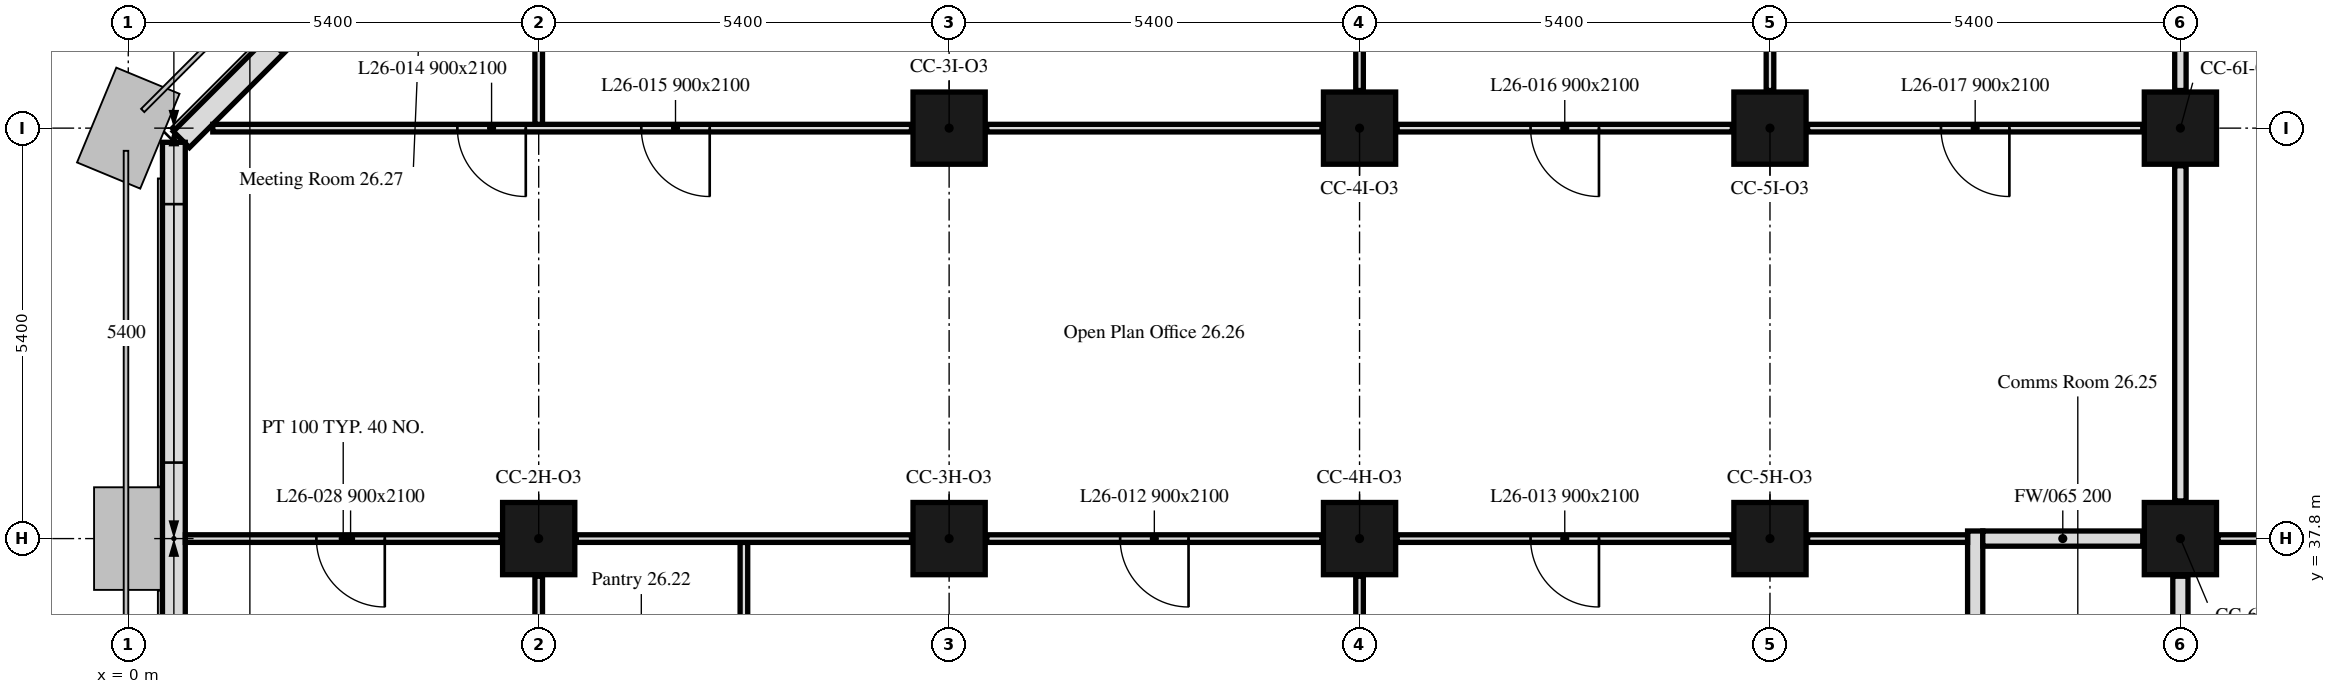
"""IFC4 building model, lengths in metres.
Left out: names, types, materials, properties, quantities, classifications, styles, units other than length and angle.
Written with IfcOpenShell. Run it as: python <this file> out.ifc"""

import sys

from ifc_helpers import new_model, si_unit, direction, frame, frame_2d, origin, origin_2d, place, context, subcontext, project, spatial, rectangle, extrude, element, fill, save


model = new_model("IFC4")
c1 = context("Model", 3, precision=1e-05, world=origin(), true_north=direction((0.0, 1.0)))
c2 = subcontext(c1, "Body", "Model", "MODEL_VIEW")
j1 = project(units=[si_unit("LENGTHUNIT", "METRE"), si_unit("PLANEANGLEUNIT", "RADIAN")], contexts=[c1])
p1 = place(None, origin())
s1 = spatial("IfcSite", under=j1, at=p1, CompositionType="ELEMENT")
p2 = place(p1, origin())
s2 = spatial("IfcBuilding", under=s1, at=p2, CompositionType="ELEMENT")
p3 = place(p2, frame((0.0, 0.0, 110.6)))
s3 = spatial("IfcBuildingStorey", under=s2, at=p3, CompositionType="ELEMENT", Elevation=110.6)
for number, where, z_axis, x_axis in (
    (1, (5.4, 37.8, 0.0), (0.0, 0.0, 1.0), (1.0, 0.0, 0.0)),
    (2, (10.8, 37.8, 0.0), (0.0, 0.0, 1.0), (1.0, 0.0, 0.0)),
    (3, (16.2, 37.8, 0.0), (0.0, 0.0, 1.0), (1.0, 0.0, 0.0)),
    (4, (21.6, 37.8, 0.0), (0.0, 0.0, 1.0), (1.0, 0.0, 0.0)),
    (5, (27.0, 37.8, 0.0), (0.0, 0.0, 1.0), (1.0, 0.0, 0.0)),
    (6, (10.8, 43.2, 0.0), (0.0, 0.0, 1.0), (1.0, 0.0, 0.0)),
    (7, (16.2, 43.2, 0.0), (0.0, 0.0, 1.0), (1.0, 0.0, 0.0)),
    (8, (21.6, 43.2, 0.0), (0.0, 0.0, 1.0), (1.0, 0.0, 0.0)),
    (9, (27.0, 43.2, 0.0), (0.0, 0.0, 1.0), (1.0, 0.0, 0.0)),
):
    element("IfcColumn", number, at=place(p3, frame(where, z_axis=z_axis, x_axis=x_axis)), inside=s3, PredefinedType="COLUMN", context=c2, shape_type="SweptSolid", body=[
        extrude(rectangle(XDim=0.95, YDim=0.95, at=origin_2d()), origin(), (0.0, 0.0, 1.0), 3.5),
    ])
p4 = place(p3, frame((5.55, 47.901, 0.0), z_axis=(0.0, 0.0, 1.0), x_axis=(-0.707106781187, -0.707106781187, 0.0)))
e10 = element("IfcWall", 10, at=p4, inside=s3, PredefinedType="SOLIDWALL", context=c2, shape_type="SweptSolid", body=[
    extrude(rectangle(XDim=6.86, YDim=0.3, at=frame_2d((3.43, 0.0))), origin(), (0.0, 0.0, 1.0), 3.5),
])
p5 = place(p4, frame((1.73, 0.0, 0.9)))
e11 = element("IfcOpeningElement", 11, at=p5, cuts=e10, PredefinedType="OPENING", context=c2, shape_type="SweptSolid", body=[
    extrude(rectangle(XDim=3.4, YDim=1.7, at=frame_2d((1.7, 0.85))), frame((0.0, 0.16, 0.0), z_axis=(0.0, -1.0, 0.0), x_axis=(1.0, 0.0, 0.0)), (0.0, 0.0, 1.0), 0.32),
])
p6 = place(p3, frame((0.6, 43.014, 0.0), z_axis=(0.0, 0.0, 1.0), x_axis=(0.0, -1.0, 0.0)))
e12 = element("IfcWall", 12, at=p6, inside=s3, PredefinedType="SOLIDWALL", context=c2, shape_type="SweptSolid", body=[
    extrude(rectangle(XDim=32.027, YDim=0.3, at=frame_2d((16.014, 0.0))), origin(), (0.0, 0.0, 1.0), 3.5),
])
p7 = place(p6, frame((0.814, 0.0, 0.9)))
e13 = element("IfcOpeningElement", 13, at=p7, cuts=e12, PredefinedType="OPENING", context=c2, shape_type="SweptSolid", body=[
    extrude(rectangle(XDim=3.4, YDim=1.7, at=frame_2d((1.7, 0.85))), frame((0.0, 0.16, 0.0), z_axis=(0.0, -1.0, 0.0), x_axis=(1.0, 0.0, 0.0)), (0.0, 0.0, 1.0), 0.32),
])
p8 = place(p6, frame((11.614, 0.0, 0.9)))
e14 = element("IfcOpeningElement", 14, at=p8, cuts=e12, PredefinedType="OPENING", context=c2, shape_type="SweptSolid", body=[
    extrude(rectangle(XDim=3.4, YDim=1.7, at=frame_2d((1.7, 0.85))), frame((0.0, 0.16, 0.0), z_axis=(0.0, -1.0, 0.0), x_axis=(1.0, 0.0, 0.0)), (0.0, 0.0, 1.0), 0.32),
])
p9 = place(p6, frame((22.414, 0.0, 0.9)))
e15 = element("IfcOpeningElement", 15, at=p9, cuts=e12, PredefinedType="OPENING", context=c2, shape_type="SweptSolid", body=[
    extrude(rectangle(XDim=3.4, YDim=1.7, at=frame_2d((1.7, 0.85))), frame((0.0, 0.16, 0.0), z_axis=(0.0, -1.0, 0.0), x_axis=(1.0, 0.0, 0.0)), (0.0, 0.0, 1.0), 0.32),
])
p10 = place(p3, frame((4.905, 37.8, 0.0), z_axis=(0.0, 0.0, 1.0), x_axis=(-1.0, 0.0, 0.0)))
e16 = element("IfcWall", 16, at=p10, inside=s3, PredefinedType="PARTITIONING", context=c2, shape_type="SweptSolid", body=[
    extrude(rectangle(XDim=4.154, YDim=0.1, at=frame_2d((2.077, 0.0))), origin(), (0.0, 0.0, 1.0), 2.75),
])
p11 = place(p10, frame((1.53, 0.0, 0.0)))
e17 = element("IfcOpeningElement", 17, at=p11, cuts=e16, PredefinedType="OPENING", context=c2, shape_type="SweptSolid", body=[
    extrude(rectangle(XDim=0.9, YDim=2.1, at=frame_2d((0.45, 1.05))), frame((0.0, 0.05, 0.0), z_axis=(0.0, -1.0, 0.0), x_axis=(1.0, 0.0, 0.0)), (0.0, 0.0, 1.0), 0.1),
])
p12 = place(p3, frame((5.4, 35.175, 0.0), z_axis=(0.0, 0.0, 1.0), x_axis=(0.0, 1.0, 0.0)))
e18 = element("IfcWall", 18, at=p12, inside=s3, PredefinedType="PARTITIONING", context=c2, shape_type="SweptSolid", body=[
    extrude(rectangle(XDim=2.13, YDim=0.1, at=frame_2d((1.065, 0.0))), origin(), (0.0, 0.0, 1.0), 3.5),
])
p13 = place(p3, frame((8.1, 35.175, 0.0), z_axis=(0.0, 0.0, 1.0), x_axis=(0.0, 1.0, 0.0)))
e19 = element("IfcWall", 19, at=p13, inside=s3, PredefinedType="PARTITIONING", context=c2, shape_type="SweptSolid", body=[
    extrude(rectangle(XDim=2.575, YDim=0.1, at=frame_2d((1.288, 0.0))), origin(), (0.0, 0.0, 1.0), 3.5),
])
p14 = place(p3, frame((16.2, 35.175, 0.0), z_axis=(0.0, 0.0, 1.0), x_axis=(0.0, 1.0, 0.0)))
e20 = element("IfcWall", 20, at=p14, inside=s3, PredefinedType="PARTITIONING", context=c2, shape_type="SweptSolid", body=[
    extrude(rectangle(XDim=2.13, YDim=0.1, at=frame_2d((1.065, 0.0))), origin(), (0.0, 0.0, 1.0), 2.75),
])
p15 = place(p3, frame((15.705, 37.8, 0.0), z_axis=(0.0, 0.0, 1.0), x_axis=(-1.0, 0.0, 0.0)))
e21 = element("IfcWall", 21, at=p15, inside=s3, PredefinedType="PARTITIONING", context=c2, shape_type="SweptSolid", body=[
    extrude(rectangle(XDim=4.41, YDim=0.1, at=frame_2d((2.205, 0.0))), origin(), (0.0, 0.0, 1.0), 2.75),
])
p16 = place(p15, frame((1.755, 0.0, 0.0)))
e22 = element("IfcOpeningElement", 22, at=p16, cuts=e21, PredefinedType="OPENING", context=c2, shape_type="SweptSolid", body=[
    extrude(rectangle(XDim=0.9, YDim=2.1, at=frame_2d((0.45, 1.05))), frame((0.0, 0.05, 0.0), z_axis=(0.0, -1.0, 0.0), x_axis=(1.0, 0.0, 0.0)), (0.0, 0.0, 1.0), 0.1),
])
p17 = place(p3, frame((10.305, 37.8, 0.0), z_axis=(0.0, 0.0, 1.0), x_axis=(-1.0, 0.0, 0.0)))
e23 = element("IfcWall", 23, at=p17, inside=s3, PredefinedType="PARTITIONING", context=c2, shape_type="SweptSolid", body=[
    extrude(rectangle(XDim=4.41, YDim=0.1, at=frame_2d((2.205, 0.0))), origin(), (0.0, 0.0, 1.0), 2.75),
])
p18 = place(p3, frame((24.3, 35.2, 0.0), z_axis=(0.0, 0.0, 1.0), x_axis=(0.0, 1.0, 0.0)))
e24 = element("IfcWall", 24, at=p18, inside=s3, PredefinedType="PARTITIONING", context=c2, shape_type="SweptSolid", body=[
    extrude(rectangle(XDim=2.7, YDim=0.2, at=frame_2d((1.35, 0.0))), origin(), (0.0, 0.0, 1.0), 3.5),
])
p19 = place(p3, frame((24.2, 37.8, 0.0), z_axis=(0.0, 0.0, 1.0), x_axis=(-1.0, 0.0, 0.0)))
e25 = element("IfcWall", 25, at=p19, inside=s3, PredefinedType="PARTITIONING", context=c2, shape_type="SweptSolid", body=[
    extrude(rectangle(XDim=2.105, YDim=0.1, at=frame_2d((1.052, 0.0))), origin(), (0.0, 0.0, 1.0), 3.5),
])
p20 = place(p3, frame((21.105, 37.8, 0.0), z_axis=(0.0, 0.0, 1.0), x_axis=(-1.0, 0.0, 0.0)))
e26 = element("IfcWall", 26, at=p20, inside=s3, PredefinedType="PARTITIONING", context=c2, shape_type="SweptSolid", body=[
    extrude(rectangle(XDim=4.41, YDim=0.1, at=frame_2d((2.205, 0.0))), origin(), (0.0, 0.0, 1.0), 3.5),
])
p21 = place(p20, frame((1.755, 0.0, 0.0)))
e27 = element("IfcOpeningElement", 27, at=p21, cuts=e26, PredefinedType="OPENING", context=c2, shape_type="SweptSolid", body=[
    extrude(rectangle(XDim=0.9, YDim=2.1, at=frame_2d((0.45, 1.05))), frame((0.0, 0.05, 0.0), z_axis=(0.0, -1.0, 0.0), x_axis=(1.0, 0.0, 0.0)), (0.0, 0.0, 1.0), 0.1),
])
p22 = place(p3, frame((27.0, 35.2, 0.0), z_axis=(0.0, 0.0, 1.0), x_axis=(0.0, 1.0, 0.0)))
e28 = element("IfcWall", 28, at=p22, inside=s3, PredefinedType="PARTITIONING", context=c2, shape_type="SweptSolid", body=[
    extrude(rectangle(XDim=2.105, YDim=0.2, at=frame_2d((1.052, 0.0))), origin(), (0.0, 0.0, 1.0), 2.75),
])
p23 = place(p3, frame((26.505, 37.8, 0.0), z_axis=(0.0, 0.0, 1.0), x_axis=(-1.0, 0.0, 0.0)))
e29 = element("IfcWall", 29, at=p23, inside=s3, PredefinedType="PARTITIONING", context=c2, shape_type="SweptSolid", body=[
    extrude(rectangle(XDim=2.105, YDim=0.2, at=frame_2d((1.052, 0.0))), origin(), (0.0, 0.0, 1.0), 3.5),
])
p24 = place(p3, frame((26.505, 43.2, 0.0), z_axis=(0.0, 0.0, 1.0), x_axis=(-1.0, 0.0, 0.0)))
e30 = element("IfcWall", 30, at=p24, inside=s3, PredefinedType="PARTITIONING", context=c2, shape_type="SweptSolid", body=[
    extrude(rectangle(XDim=4.41, YDim=0.1, at=frame_2d((2.205, 0.0))), origin(), (0.0, 0.0, 1.0), 3.5),
])
p25 = place(p24, frame((1.755, 0.0, 0.0)))
e31 = element("IfcOpeningElement", 31, at=p25, cuts=e30, PredefinedType="OPENING", context=c2, shape_type="SweptSolid", body=[
    extrude(rectangle(XDim=0.9, YDim=2.1, at=frame_2d((0.45, 1.05))), frame((0.0, 0.05, 0.0), z_axis=(0.0, -1.0, 0.0), x_axis=(1.0, 0.0, 0.0)), (0.0, 0.0, 1.0), 0.1),
])
p26 = place(p3, frame((21.105, 43.2, 0.0), z_axis=(0.0, 0.0, 1.0), x_axis=(-1.0, 0.0, 0.0)))
e32 = element("IfcWall", 32, at=p26, inside=s3, PredefinedType="PARTITIONING", context=c2, shape_type="SweptSolid", body=[
    extrude(rectangle(XDim=4.41, YDim=0.1, at=frame_2d((2.205, 0.0))), origin(), (0.0, 0.0, 1.0), 3.5),
])
p27 = place(p26, frame((1.755, 0.0, 0.0)))
e33 = element("IfcOpeningElement", 33, at=p27, cuts=e32, PredefinedType="OPENING", context=c2, shape_type="SweptSolid", body=[
    extrude(rectangle(XDim=0.9, YDim=2.1, at=frame_2d((0.45, 1.05))), frame((0.0, 0.05, 0.0), z_axis=(0.0, -1.0, 0.0), x_axis=(1.0, 0.0, 0.0)), (0.0, 0.0, 1.0), 0.1),
])
p28 = place(p3, frame((15.705, 43.2, 0.0), z_axis=(0.0, 0.0, 1.0), x_axis=(-1.0, 0.0, 0.0)))
e34 = element("IfcWall", 34, at=p28, inside=s3, PredefinedType="PARTITIONING", context=c2, shape_type="SweptSolid", body=[
    extrude(rectangle(XDim=4.41, YDim=0.1, at=frame_2d((2.205, 0.0))), origin(), (0.0, 0.0, 1.0), 3.5),
])
p29 = place(p3, frame((10.305, 43.2, 0.0), z_axis=(0.0, 0.0, 1.0), x_axis=(-1.0, 0.0, 0.0)))
e35 = element("IfcWall", 35, at=p29, inside=s3, PredefinedType="PARTITIONING", context=c2, shape_type="SweptSolid", body=[
    extrude(rectangle(XDim=9.193, YDim=0.1, at=frame_2d((4.596, 0.0))), origin(), (0.0, 0.0, 1.0), 3.5),
])
p30 = place(p29, frame((5.075, 0.0, 0.0)))
e36 = element("IfcOpeningElement", 36, at=p30, cuts=e35, PredefinedType="OPENING", context=c2, shape_type="SweptSolid", body=[
    extrude(rectangle(XDim=0.9, YDim=2.1, at=frame_2d((0.45, 1.05))), frame((0.0, 0.05, 0.0), z_axis=(0.0, -1.0, 0.0), x_axis=(1.0, 0.0, 0.0)), (0.0, 0.0, 1.0), 0.1),
])
p31 = place(p29, frame((2.655, 0.0, 0.0)))
e37 = element("IfcOpeningElement", 37, at=p31, cuts=e35, PredefinedType="OPENING", context=c2, shape_type="SweptSolid", body=[
    extrude(rectangle(XDim=0.9, YDim=2.1, at=frame_2d((0.45, 1.05))), frame((0.0, 0.05, 0.0), z_axis=(0.0, -1.0, 0.0), x_axis=(1.0, 0.0, 0.0)), (0.0, 0.0, 1.0), 0.1),
])
p32 = place(p3, frame((27.0, 38.295, 0.0), z_axis=(0.0, 0.0, 1.0), x_axis=(0.0, 1.0, 0.0)))
e38 = element("IfcWall", 38, at=p32, inside=s3, PredefinedType="PARTITIONING", context=c2, shape_type="SweptSolid", body=[
    extrude(rectangle(XDim=4.41, YDim=0.15, at=frame_2d((2.205, 0.0))), origin(), (0.0, 0.0, 1.0), 2.75),
])
p33 = place(p3, frame((5.4, 43.25, 0.0), z_axis=(0.0, 0.0, 1.0), x_axis=(0.0, 1.0, 0.0)))
e39 = element("IfcWall", 39, at=p33, inside=s3, PredefinedType="PARTITIONING", context=c2, shape_type="SweptSolid", body=[
    extrude(rectangle(XDim=4.238, YDim=0.1, at=frame_2d((2.119, 0.0))), origin(), (0.0, 0.0, 1.0), 3.5),
])
for number, where, z_axis, x_axis in (
    (40, (16.2, 43.695, 0.0), (0.0, 0.0, 1.0), (0.0, 1.0, 0.0)),
    (41, (21.6, 43.695, 0.0), (0.0, 0.0, 1.0), (0.0, 1.0, 0.0)),
):
    element("IfcWall", number, at=place(p3, frame(where, z_axis=z_axis, x_axis=x_axis)), inside=s3, PredefinedType="PARTITIONING", context=c2, shape_type="SweptSolid", body=[
        extrude(rectangle(XDim=4.154, YDim=0.1, at=frame_2d((2.077, 0.0))), origin(), (0.0, 0.0, 1.0), 2.75),
    ])
p34 = place(p3, frame((27.0, 43.695, 0.0), z_axis=(0.0, 0.0, 1.0), x_axis=(0.0, 1.0, 0.0)))
e42 = element("IfcWall", 42, at=p34, inside=s3, PredefinedType="PARTITIONING", context=c2, shape_type="SweptSolid", body=[
    extrude(rectangle(XDim=4.154, YDim=0.15, at=frame_2d((2.077, 0.0))), origin(), (0.0, 0.0, 1.0), 2.75),
])
p35 = place(p3, frame((31.905, 37.8, 0.0), z_axis=(0.0, 0.0, 1.0), x_axis=(-1.0, 0.0, 0.0)))
e43 = element("IfcWall", 43, at=p35, inside=s3, PredefinedType="PARTITIONING", context=c2, shape_type="SweptSolid", body=[
    extrude(rectangle(XDim=4.41, YDim=0.1, at=frame_2d((2.205, 0.0))), origin(), (0.0, 0.0, 1.0), 3.5),
])
p36 = place(p35, frame((1.755, 0.0, 0.0)))
e44 = element("IfcOpeningElement", 44, at=p36, cuts=e43, PredefinedType="OPENING", context=c2, shape_type="SweptSolid", body=[
    extrude(rectangle(XDim=0.9, YDim=2.1, at=frame_2d((0.45, 1.05))), frame((0.0, 0.05, 0.0), z_axis=(0.0, -1.0, 0.0), x_axis=(1.0, 0.0, 0.0)), (0.0, 0.0, 1.0), 0.1),
])
p37 = place(p7, origin())
e45 = element("IfcWindow", 45, at=p37, inside=s3, PartitioningType="SINGLE_PANEL", PredefinedType="WINDOW", context=c2, shape_type="SweptSolid", body=[
    extrude(rectangle(XDim=3.4, YDim=1.7, at=frame_2d((1.7, 0.85))), frame((0.0, 0.03, 0.0), z_axis=(0.0, -1.0, 0.0), x_axis=(1.0, 0.0, 0.0)), (0.0, 0.0, 1.0), 0.06),
])
fill(e13, e45)
p38 = place(p16, origin())
e46 = element("IfcDoor", 46, at=p38, inside=s3, OperationType="SINGLE_SWING_LEFT", PredefinedType="DOOR", context=c2, shape_type="SweptSolid", body=[
    extrude(rectangle(XDim=0.9, YDim=2.1, at=frame_2d((0.45, 1.05))), frame((0.0, 0.025, 0.0), z_axis=(0.0, -1.0, 0.0), x_axis=(1.0, 0.0, 0.0)), (0.0, 0.0, 1.0), 0.05),
])
fill(e22, e46)
p39 = place(p21, origin())
e47 = element("IfcDoor", 47, at=p39, inside=s3, OperationType="SINGLE_SWING_RIGHT", PredefinedType="DOOR", context=c2, shape_type="SweptSolid", body=[
    extrude(rectangle(XDim=0.9, YDim=2.1, at=frame_2d((0.45, 1.05))), frame((0.0, 0.025, 0.0), z_axis=(0.0, -1.0, 0.0), x_axis=(1.0, 0.0, 0.0)), (0.0, 0.0, 1.0), 0.05),
])
fill(e27, e47)
p40 = place(p30, origin())
e48 = element("IfcDoor", 48, at=p40, inside=s3, OperationType="SINGLE_SWING_LEFT", PredefinedType="DOOR", context=c2, shape_type="SweptSolid", body=[
    extrude(rectangle(XDim=0.9, YDim=2.1, at=frame_2d((0.45, 1.05))), frame((0.0, 0.025, 0.0), z_axis=(0.0, -1.0, 0.0), x_axis=(1.0, 0.0, 0.0)), (0.0, 0.0, 1.0), 0.05),
])
fill(e36, e48)
p41 = place(p31, origin())
e49 = element("IfcDoor", 49, at=p41, inside=s3, OperationType="SINGLE_SWING_LEFT", PredefinedType="DOOR", context=c2, shape_type="SweptSolid", body=[
    extrude(rectangle(XDim=0.9, YDim=2.1, at=frame_2d((0.45, 1.05))), frame((0.0, 0.025, 0.0), z_axis=(0.0, -1.0, 0.0), x_axis=(1.0, 0.0, 0.0)), (0.0, 0.0, 1.0), 0.05),
])
fill(e37, e49)
p42 = place(p27, origin())
e50 = element("IfcDoor", 50, at=p42, inside=s3, OperationType="SINGLE_SWING_LEFT", PredefinedType="DOOR", context=c2, shape_type="SweptSolid", body=[
    extrude(rectangle(XDim=0.9, YDim=2.1, at=frame_2d((0.45, 1.05))), frame((0.0, 0.025, 0.0), z_axis=(0.0, -1.0, 0.0), x_axis=(1.0, 0.0, 0.0)), (0.0, 0.0, 1.0), 0.05),
])
fill(e33, e50)
p43 = place(p25, origin())
e51 = element("IfcDoor", 51, at=p43, inside=s3, OperationType="SINGLE_SWING_LEFT", PredefinedType="DOOR", context=c2, shape_type="SweptSolid", body=[
    extrude(rectangle(XDim=0.9, YDim=2.1, at=frame_2d((0.45, 1.05))), frame((0.0, 0.025, 0.0), z_axis=(0.0, -1.0, 0.0), x_axis=(1.0, 0.0, 0.0)), (0.0, 0.0, 1.0), 0.05),
])
fill(e31, e51)
p44 = place(p11, origin())
e52 = element("IfcDoor", 52, at=p44, inside=s3, OperationType="SINGLE_SWING_RIGHT", PredefinedType="DOOR", context=c2, shape_type="SweptSolid", body=[
    extrude(rectangle(XDim=0.9, YDim=2.1, at=frame_2d((0.45, 1.05))), frame((0.0, 0.025, 0.0), z_axis=(0.0, -1.0, 0.0), x_axis=(1.0, 0.0, 0.0)), (0.0, 0.0, 1.0), 0.05),
])
fill(e17, e52)
save(model, sys.argv[1])
